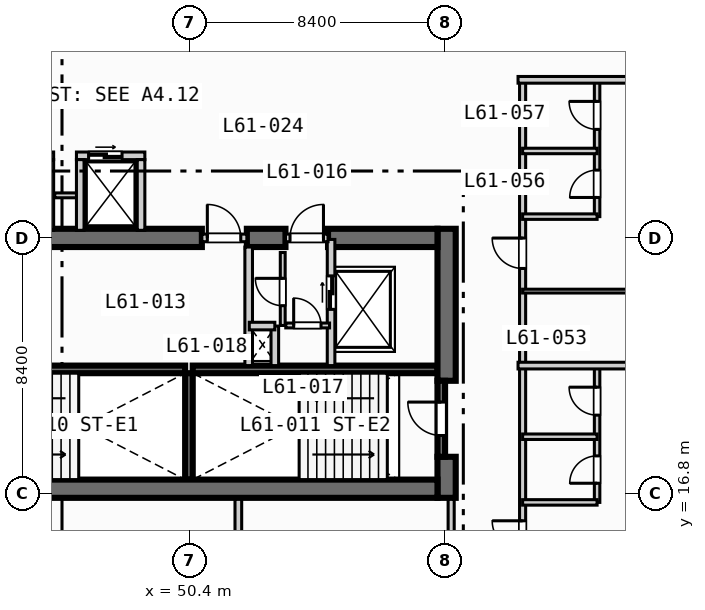
"""IFC4 building model, lengths in metres.
Left out: names, types, materials, properties, quantities, classifications, styles, units other than length and angle.
Written with IfcOpenShell. Run it as: python <this file> out.ifc"""

import sys

from ifc_helpers import new_model, si_unit, direction, frame, frame_2d, origin, place, context, subcontext, project, spatial, rectangle, extrude, element, fill, save


model = new_model("IFC4")
c1 = context("Model", 3, precision=1e-05, world=origin(), true_north=direction((0.0, 1.0)))
c2 = subcontext(c1, "Body", "Model", "MODEL_VIEW")
j1 = project(units=[si_unit("LENGTHUNIT", "METRE"), si_unit("PLANEANGLEUNIT", "RADIAN")], contexts=[c1])
p1 = place(None, origin())
s1 = spatial("IfcSite", under=j1, at=p1, CompositionType="ELEMENT")
p2 = place(p1, origin())
s2 = spatial("IfcBuilding", under=s1, at=p2, CompositionType="ELEMENT")
p3 = place(p2, frame((0.0, 0.0, 249.0)))
s3 = spatial("IfcBuildingStorey", under=s2, at=p3, CompositionType="ELEMENT", Elevation=249.0)
for number, where, z_axis, x_axis in (
    (1, (42.2, 20.875, 0.0), (0.0, 0.0, 1.0), (1.0, 0.0, 0.0)),
    (2, (50.5, 20.875, 0.0), (0.0, 0.0, 1.0), (1.0, 0.0, 0.0)),
):
    element("IfcWall", number, at=place(p3, frame(where, z_axis=z_axis, x_axis=x_axis)), inside=s3, PredefinedType="SOLIDWALL", context=c2, shape_type="SweptSolid", body=[
        extrude(rectangle(XDim=8.05, YDim=0.25, at=frame_2d((4.025, 0.0))), origin(), (0.0, 0.0, 1.0), 3.47),
    ])
p4 = place(p3, frame((50.375, 17.25, 0.0), z_axis=(0.0, 0.0, 1.0), x_axis=(0.0, 1.0, 0.0)))
e3 = element("IfcWall", 3, at=p4, inside=s3, PredefinedType="SOLIDWALL", context=c2, shape_type="SweptSolid", body=[
    extrude(rectangle(XDim=3.5, YDim=0.25, at=frame_2d((1.75, 0.0))), origin(), (0.0, 0.0, 1.0), 3.47),
])
p5 = place(p3, frame((58.85, 16.65, 0.0), z_axis=(0.0, 0.0, 1.0), x_axis=(0.0, 1.0, 0.0)))
e4 = element("IfcWall", 4, at=p5, inside=s3, PredefinedType="SHEAR", context=c2, shape_type="SweptSolid", body=[
    extrude(rectangle(XDim=1.35, YDim=0.6, at=frame_2d((0.675, 0.0))), origin(), (0.0, 0.0, 1.0), 3.47),
])
p6 = place(p3, frame((58.85, 20.5, 0.0), z_axis=(0.0, 0.0, 1.0), x_axis=(0.0, 1.0, 0.0)))
e5 = element("IfcWall", 5, at=p6, inside=s3, PredefinedType="SHEAR", context=c2, shape_type="SweptSolid", body=[
    extrude(rectangle(XDim=5.0, YDim=0.6, at=frame_2d((2.5, 0.0))), origin(), (0.0, 0.0, 1.0), 3.47),
])
p7 = place(p3, frame((42.2, 16.95, 0.0), z_axis=(0.0, 0.0, 1.0), x_axis=(1.0, 0.0, 0.0)))
e6 = element("IfcWall", 6, at=p7, inside=s3, PredefinedType="SHEAR", context=c2, shape_type="SweptSolid", body=[
    extrude(rectangle(XDim=16.35, YDim=0.6, at=frame_2d((8.175, 0.0))), origin(), (0.0, 0.0, 1.0), 3.47),
])
p8 = place(p3, frame((42.2, 25.2, 0.0), z_axis=(0.0, 0.0, 1.0), x_axis=(1.0, 0.0, 0.0)))
e7 = element("IfcWall", 7, at=p8, inside=s3, PredefinedType="SHEAR", context=c2, shape_type="SweptSolid", body=[
    extrude(rectangle(XDim=8.6, YDim=0.6, at=frame_2d((4.3, 0.0))), origin(), (0.0, 0.0, 1.0), 3.47),
])
p9 = place(p3, frame((52.28, 25.2, 0.0), z_axis=(0.0, 0.0, 1.0), x_axis=(1.0, 0.0, 0.0)))
e8 = element("IfcWall", 8, at=p9, inside=s3, PredefinedType="SHEAR", context=c2, shape_type="SweptSolid", body=[
    extrude(rectangle(XDim=1.27, YDim=0.6, at=frame_2d((0.635, 0.0))), origin(), (0.0, 0.0, 1.0), 3.47),
])
p10 = place(p3, frame((54.95, 25.2, 0.0), z_axis=(0.0, 0.0, 1.0), x_axis=(1.0, 0.0, 0.0)))
e9 = element("IfcWall", 9, at=p10, inside=s3, PredefinedType="SHEAR", context=c2, shape_type="SweptSolid", body=[
    extrude(rectangle(XDim=3.6, YDim=0.6, at=frame_2d((1.8, 0.0))), origin(), (0.0, 0.0, 1.0), 3.47),
])
p11 = place(p3, frame((58.675, 18.0, 0.0), z_axis=(0.0, 0.0, 1.0), x_axis=(0.0, 1.0, 0.0)))
e10 = element("IfcWall", 10, at=p11, inside=s3, PredefinedType="SOLIDWALL", context=c2, shape_type="SweptSolid", body=[
    extrude(rectangle(XDim=2.5, YDim=0.25, at=frame_2d((1.25, 0.0))), origin(), (0.0, 0.0, 1.0), 3.47),
])
p12 = place(p11, frame((0.7, 0.0, 0.0)))
e11 = element("IfcOpeningElement", 11, at=p12, cuts=e10, PredefinedType="OPENING", context=c2, shape_type="SweptSolid", body=[
    extrude(rectangle(XDim=1.1, YDim=2.15, at=frame_2d((0.55, 1.075))), frame((0.0, 0.135, 0.0), z_axis=(0.0, -1.0, 0.0), x_axis=(1.0, 0.0, 0.0)), (0.0, 0.0, 1.0), 0.27),
])
p13 = place(p3, frame((50.8, 25.2, 0.0), z_axis=(0.0, 0.0, 1.0), x_axis=(1.0, 0.0, 0.0)))
e12 = element("IfcWall", 12, at=p13, inside=s3, PredefinedType="SOLIDWALL", context=c2, shape_type="SweptSolid", body=[
    extrude(rectangle(XDim=1.48, YDim=0.25, at=frame_2d((0.74, 0.0))), origin(), (0.0, 0.0, 1.0), 3.47),
])
p14 = place(p13, frame((0.18, 0.0, 0.0)))
e13 = element("IfcOpeningElement", 13, at=p14, cuts=e12, PredefinedType="OPENING", context=c2, shape_type="SweptSolid", body=[
    extrude(rectangle(XDim=1.1, YDim=2.15, at=frame_2d((0.55, 1.075))), frame((0.0, 0.135, 0.0), z_axis=(0.0, -1.0, 0.0), x_axis=(1.0, 0.0, 0.0)), (0.0, 0.0, 1.0), 0.27),
])
p15 = place(p3, frame((52.34, 21.0, 0.0), z_axis=(0.0, 0.0, 1.0), x_axis=(0.0, 1.0, 0.0)))
e14 = element("IfcWall", 14, at=p15, inside=s3, PredefinedType="SOLIDWALL", context=c2, shape_type="SweptSolid", body=[
    extrude(rectangle(XDim=3.9, YDim=0.25, at=frame_2d((1.95, 0.0))), origin(), (0.0, 0.0, 1.0), 3.47),
])
p16 = place(p3, frame((55.05, 21.0, 0.0), z_axis=(0.0, 0.0, 1.0), x_axis=(0.0, 1.0, 0.0)))
e15 = element("IfcWall", 15, at=p16, inside=s3, PredefinedType="SOLIDWALL", context=c2, shape_type="SweptSolid", body=[
    extrude(rectangle(XDim=4.15, YDim=0.25, at=frame_2d((2.075, 0.0))), origin(), (0.0, 0.0, 1.0), 3.47),
])
p17 = place(p16, frame((1.85, 0.0, 0.0)))
e16 = element("IfcOpeningElement", 16, at=p17, cuts=e15, PredefinedType="OPENING", context=c2, shape_type="SweptSolid", body=[
    extrude(rectangle(XDim=1.1, YDim=2.15, at=frame_2d((0.55, 1.075))), frame((0.0, 0.135, 0.0), z_axis=(0.0, -1.0, 0.0), x_axis=(1.0, 0.0, 0.0)), (0.0, 0.0, 1.0), 0.27),
])
p18 = place(p3, frame((53.55, 25.2, 0.0), z_axis=(0.0, 0.0, 1.0), x_axis=(1.0, 0.0, 0.0)))
e17 = element("IfcWall", 17, at=p18, inside=s3, PredefinedType="SOLIDWALL", context=c2, shape_type="SweptSolid", body=[
    extrude(rectangle(XDim=1.4, YDim=0.25, at=frame_2d((0.7, 0.0))), origin(), (0.0, 0.0, 1.0), 3.47),
])
p19 = place(p18, frame((0.15, 0.0, 0.0)))
e18 = element("IfcOpeningElement", 18, at=p19, cuts=e17, PredefinedType="OPENING", context=c2, shape_type="SweptSolid", body=[
    extrude(rectangle(XDim=1.1, YDim=2.15, at=frame_2d((0.55, 1.075))), frame((0.0, 0.135, 0.0), z_axis=(0.0, -1.0, 0.0), x_axis=(1.0, 0.0, 0.0)), (0.0, 0.0, 1.0), 0.27),
])
p20 = place(p3, frame((53.2, 21.0, 0.0), z_axis=(0.0, 0.0, 1.0), x_axis=(0.0, 1.0, 0.0)))
e19 = element("IfcWall", 19, at=p20, inside=s3, PredefinedType="SOLIDWALL", context=c2, shape_type="SweptSolid", body=[
    extrude(rectangle(XDim=1.3, YDim=0.25, at=frame_2d((0.65, 0.0))), origin(), (0.0, 0.0, 1.0), 3.47),
])
p21 = place(p3, frame((52.36, 22.3, 0.0), z_axis=(0.0, 0.0, 1.0), x_axis=(1.0, 0.0, 0.0)))
e20 = element("IfcWall", 20, at=p21, inside=s3, PredefinedType="SOLIDWALL", context=c2, shape_type="SweptSolid", body=[
    extrude(rectangle(XDim=0.84, YDim=0.25, at=frame_2d((0.42, 0.0))), origin(), (0.0, 0.0, 1.0), 3.47),
])
p22 = place(p3, frame((53.56, 22.32, 0.0), z_axis=(0.0, 0.0, 1.0), x_axis=(1.0, 0.0, 0.0)))
e21 = element("IfcWall", 21, at=p22, inside=s3, PredefinedType="PARTITIONING", context=c2, shape_type="SweptSolid", body=[
    extrude(rectangle(XDim=1.44, YDim=0.16, at=frame_2d((0.72, 0.0))), origin(), (0.0, 0.0, 1.0), 3.47),
])
p23 = place(p22, frame((0.26, 0.0, 0.0)))
e22 = element("IfcOpeningElement", 22, at=p23, cuts=e21, PredefinedType="OPENING", context=c2, shape_type="SweptSolid", body=[
    extrude(rectangle(XDim=0.9, YDim=2.1, at=frame_2d((0.45, 1.05))), frame((0.0, 0.09, 0.0), z_axis=(0.0, -1.0, 0.0), x_axis=(1.0, 0.0, 0.0)), (0.0, 0.0, 1.0), 0.18),
])
p24 = place(p3, frame((53.46, 22.32, 0.0), z_axis=(0.0, 0.0, 1.0), x_axis=(0.0, 1.0, 0.0)))
e23 = element("IfcWall", 23, at=p24, inside=s3, PredefinedType="PARTITIONING", context=c2, shape_type="SweptSolid", body=[
    extrude(rectangle(XDim=2.4, YDim=0.16, at=frame_2d((1.2, 0.0))), origin(), (0.0, 0.0, 1.0), 3.47),
])
p25 = place(p24, frame((0.65, 0.0, 0.0)))
e24 = element("IfcOpeningElement", 24, at=p25, cuts=e23, PredefinedType="OPENING", context=c2, shape_type="SweptSolid", body=[
    extrude(rectangle(XDim=0.9, YDim=2.1, at=frame_2d((0.45, 1.05))), frame((0.0, 0.09, 0.0), z_axis=(0.0, -1.0, 0.0), x_axis=(1.0, 0.0, 0.0)), (0.0, 0.0, 1.0), 0.18),
])
p26 = place(p3, frame((43.675, 27.9, 0.0), z_axis=(0.0, 0.0, 1.0), x_axis=(1.0, 0.0, 0.0)))
e25 = element("IfcWall", 25, at=p26, inside=s3, PredefinedType="SOLIDWALL", context=c2, shape_type="SweptSolid", body=[
    extrude(rectangle(XDim=2.25, YDim=0.25, at=frame_2d((1.125, 0.0))), origin(), (0.0, 0.0, 1.0), 3.47),
])
p27 = place(p26, frame((0.4, 0.0, 0.0)))
e26 = element("IfcOpeningElement", 26, at=p27, cuts=e25, PredefinedType="OPENING", context=c2, shape_type="SweptSolid", body=[
    extrude(rectangle(XDim=1.1, YDim=2.15, at=frame_2d((0.55, 1.075))), frame((0.0, 0.135, 0.0), z_axis=(0.0, -1.0, 0.0), x_axis=(1.0, 0.0, 0.0)), (0.0, 0.0, 1.0), 0.27),
])
p28 = place(p3, frame((45.8, 25.45, 0.0), z_axis=(0.0, 0.0, 1.0), x_axis=(0.0, 1.0, 0.0)))
e27 = element("IfcWall", 27, at=p28, inside=s3, PredefinedType="SOLIDWALL", context=c2, shape_type="SweptSolid", body=[
    extrude(rectangle(XDim=2.325, YDim=0.25, at=frame_2d((1.163, 0.0))), origin(), (0.0, 0.0, 1.0), 3.47),
])
p29 = place(p3, frame((45.96, 26.6, 0.0), z_axis=(0.0, 0.0, 1.0), x_axis=(1.0, 0.0, 0.0)))
e28 = element("IfcWall", 28, at=p29, inside=s3, PredefinedType="PARTITIONING", context=c2, shape_type="SweptSolid", body=[
    extrude(rectangle(XDim=0.88, YDim=0.16, at=frame_2d((0.44, 0.0))), origin(), (0.0, 0.0, 1.0), 3.47),
])
p30 = place(p3, frame((46.675, 27.9, 0.0), z_axis=(0.0, 0.0, 1.0), x_axis=(1.0, 0.0, 0.0)))
e29 = element("IfcWall", 29, at=p30, inside=s3, PredefinedType="SOLIDWALL", context=c2, shape_type="SweptSolid", body=[
    extrude(rectangle(XDim=2.25, YDim=0.25, at=frame_2d((1.125, 0.0))), origin(), (0.0, 0.0, 1.0), 3.47),
])
p31 = place(p30, frame((0.4, 0.0, 0.0)))
e30 = element("IfcOpeningElement", 30, at=p31, cuts=e29, PredefinedType="OPENING", context=c2, shape_type="SweptSolid", body=[
    extrude(rectangle(XDim=1.1, YDim=2.15, at=frame_2d((0.55, 1.075))), frame((0.0, 0.135, 0.0), z_axis=(0.0, -1.0, 0.0), x_axis=(1.0, 0.0, 0.0)), (0.0, 0.0, 1.0), 0.27),
])
for number, where, z_axis, x_axis in (
    (31, (46.8, 25.45, 0.0), (0.0, 0.0, 1.0), (0.0, 1.0, 0.0)),
    (32, (48.8, 25.45, 0.0), (0.0, 0.0, 1.0), (0.0, 1.0, 0.0)),
):
    element("IfcWall", number, at=place(p3, frame(where, z_axis=z_axis, x_axis=x_axis)), inside=s3, PredefinedType="SOLIDWALL", context=c2, shape_type="SweptSolid", body=[
        extrude(rectangle(XDim=2.325, YDim=0.25, at=frame_2d((1.163, 0.0))), origin(), (0.0, 0.0, 1.0), 3.47),
    ])
p32 = place(p3, frame((59.0, 8.65, 0.0), z_axis=(0.0, 0.0, 1.0), x_axis=(0.0, 1.0, 0.0)))
e33 = element("IfcWall", 33, at=p32, inside=s3, PredefinedType="PARTITIONING", context=c2, shape_type="SweptSolid", body=[
    extrude(rectangle(XDim=7.95, YDim=0.2, at=frame_2d((3.975, 0.0))), origin(), (0.0, 0.0, 1.0), 2.82),
])
p33 = place(p32, frame((2.2, 0.0, 0.0)))
e34 = element("IfcOpeningElement", 34, at=p33, cuts=e33, PredefinedType="OPENING", context=c2, shape_type="SweptSolid", body=[
    extrude(rectangle(XDim=0.92, YDim=2.1, at=frame_2d((0.46, 1.05))), frame((0.0, 0.11, 0.0), z_axis=(0.0, -1.0, 0.0), x_axis=(1.0, 0.0, 0.0)), (0.0, 0.0, 1.0), 0.22),
])
p34 = place(p3, frame((52.0, 8.65, 0.0), z_axis=(0.0, 0.0, 1.0), x_axis=(0.0, 1.0, 0.0)))
e35 = element("IfcWall", 35, at=p34, inside=s3, PredefinedType="PARTITIONING", context=c2, shape_type="SweptSolid", body=[
    extrude(rectangle(XDim=7.95, YDim=0.22, at=frame_2d((3.975, 0.0))), origin(), (0.0, 0.0, 1.0), 3.47),
])
p35 = place(p3, frame((61.35, 11.8, 0.0), z_axis=(0.0, 0.0, 1.0), x_axis=(0.0, 1.0, 0.0)))
e36 = element("IfcWall", 36, at=p35, inside=s3, PredefinedType="PARTITIONING", context=c2, shape_type="SweptSolid", body=[
    extrude(rectangle(XDim=18.6, YDim=0.2, at=frame_2d((9.3, 0.0))), origin(), (0.0, 0.0, 1.0), 3.47),
])
p36 = place(p35, frame((3.095, 0.0, 0.0)))
e37 = element("IfcOpeningElement", 37, at=p36, cuts=e36, PredefinedType="OPENING", context=c2, shape_type="SweptSolid", body=[
    extrude(rectangle(XDim=1.0, YDim=2.15, at=frame_2d((0.5, 1.075))), frame((0.0, 0.11, 0.0), z_axis=(0.0, -1.0, 0.0), x_axis=(1.0, 0.0, 0.0)), (0.0, 0.0, 1.0), 0.22),
])
p37 = place(p35, frame((12.395, 0.0, 0.0)))
e38 = element("IfcOpeningElement", 38, at=p37, cuts=e36, PredefinedType="OPENING", context=c2, shape_type="SweptSolid", body=[
    extrude(rectangle(XDim=1.0, YDim=2.15, at=frame_2d((0.5, 1.075))), frame((0.0, 0.11, 0.0), z_axis=(0.0, -1.0, 0.0), x_axis=(1.0, 0.0, 0.0)), (0.0, 0.0, 1.0), 0.22),
])
p38 = place(p3, frame((63.8, 16.5, 0.0), z_axis=(0.0, 0.0, 1.0), x_axis=(0.0, 1.0, 0.0)))
e39 = element("IfcWall", 39, at=p38, inside=s3, PredefinedType="PLUMBINGWALL", context=c2, shape_type="SweptSolid", body=[
    extrude(rectangle(XDim=4.5, YDim=0.18, at=frame_2d((2.25, 0.0))), origin(), (0.0, 0.0, 1.0), 3.47),
])
p39 = place(p38, frame((0.63, 0.0, 0.0)))
e40 = element("IfcOpeningElement", 40, at=p39, cuts=e39, PredefinedType="OPENING", context=c2, shape_type="SweptSolid", body=[
    extrude(rectangle(XDim=0.9, YDim=2.1, at=frame_2d((0.45, 1.05))), frame((0.0, 0.1, 0.0), z_axis=(0.0, -1.0, 0.0), x_axis=(1.0, 0.0, 0.0)), (0.0, 0.0, 1.0), 0.2),
])
p40 = place(p38, frame((2.87, 0.0, 0.0)))
e41 = element("IfcOpeningElement", 41, at=p40, cuts=e39, PredefinedType="OPENING", context=c2, shape_type="SweptSolid", body=[
    extrude(rectangle(XDim=0.92, YDim=2.1, at=frame_2d((0.46, 1.05))), frame((0.0, 0.1, 0.0), z_axis=(0.0, -1.0, 0.0), x_axis=(1.0, 0.0, 0.0)), (0.0, 0.0, 1.0), 0.2),
])
p41 = place(p3, frame((61.35, 16.5, 0.0), z_axis=(0.0, 0.0, 1.0), x_axis=(1.0, 0.0, 0.0)))
e42 = element("IfcWall", 42, at=p41, inside=s3, PredefinedType="PLUMBINGWALL", context=c2, shape_type="SweptSolid", body=[
    extrude(rectangle(XDim=2.45, YDim=0.18, at=frame_2d((1.225, 0.0))), origin(), (0.0, 0.0, 1.0), 2.82),
])
p42 = place(p3, frame((61.35, 18.66, 0.0), z_axis=(0.0, 0.0, 1.0), x_axis=(1.0, 0.0, 0.0)))
e43 = element("IfcWall", 43, at=p42, inside=s3, PredefinedType="PLUMBINGWALL", context=c2, shape_type="SweptSolid", body=[
    extrude(rectangle(XDim=2.45, YDim=0.18, at=frame_2d((1.225, 0.0))), origin(), (0.0, 0.0, 1.0), 3.47),
])
p43 = place(p3, frame((61.2, 21.0, 0.0), z_axis=(0.0, 0.0, 1.0), x_axis=(1.0, 0.0, 0.0)))
e44 = element("IfcWall", 44, at=p43, inside=s3, PredefinedType="PARTITIONING", context=c2, shape_type="SweptSolid", body=[
    extrude(rectangle(XDim=14.2, YDim=0.22, at=frame_2d((7.1, 0.0))), origin(), (0.0, 0.0, 1.0), 3.47),
])
p44 = place(p3, frame((63.8, 25.9, 0.0), z_axis=(0.0, 0.0, 1.0), x_axis=(0.0, 1.0, 0.0)))
e45 = element("IfcWall", 45, at=p44, inside=s3, PredefinedType="PLUMBINGWALL", context=c2, shape_type="SweptSolid", body=[
    extrude(rectangle(XDim=4.5, YDim=0.18, at=frame_2d((2.25, 0.0))), origin(), (0.0, 0.0, 1.0), 3.47),
])
p45 = place(p44, frame((0.63, 0.0, 0.0)))
e46 = element("IfcOpeningElement", 46, at=p45, cuts=e45, PredefinedType="OPENING", context=c2, shape_type="SweptSolid", body=[
    extrude(rectangle(XDim=0.9, YDim=2.1, at=frame_2d((0.45, 1.05))), frame((0.0, 0.1, 0.0), z_axis=(0.0, -1.0, 0.0), x_axis=(1.0, 0.0, 0.0)), (0.0, 0.0, 1.0), 0.2),
])
p46 = place(p44, frame((2.87, 0.0, 0.0)))
e47 = element("IfcOpeningElement", 47, at=p46, cuts=e45, PredefinedType="OPENING", context=c2, shape_type="SweptSolid", body=[
    extrude(rectangle(XDim=0.92, YDim=2.1, at=frame_2d((0.46, 1.05))), frame((0.0, 0.1, 0.0), z_axis=(0.0, -1.0, 0.0), x_axis=(1.0, 0.0, 0.0)), (0.0, 0.0, 1.0), 0.2),
])
for number, where, z_axis, x_axis in (
    (48, (61.35, 25.9, 0.0), (0.0, 0.0, 1.0), (1.0, 0.0, 0.0)),
    (49, (61.35, 28.06, 0.0), (0.0, 0.0, 1.0), (1.0, 0.0, 0.0)),
):
    element("IfcWall", number, at=place(p3, frame(where, z_axis=z_axis, x_axis=x_axis)), inside=s3, PredefinedType="PLUMBINGWALL", context=c2, shape_type="SweptSolid", body=[
        extrude(rectangle(XDim=2.45, YDim=0.18, at=frame_2d((1.225, 0.0))), origin(), (0.0, 0.0, 1.0), 3.47),
    ])
p47 = place(p3, frame((61.35, 23.45, 0.0), z_axis=(0.0, 0.0, 1.0), x_axis=(1.0, 0.0, 0.0)))
e50 = element("IfcWall", 50, at=p47, inside=s3, PredefinedType="PARTITIONING", context=c2, shape_type="SweptSolid", body=[
    extrude(rectangle(XDim=13.87, YDim=0.125, at=frame_2d((6.935, 0.0))), origin(), (0.0, 0.0, 1.0), 3.47),
])
p48 = place(p47, frame((7.7, 0.0, 0.0)))
e51 = element("IfcOpeningElement", 51, at=p48, cuts=e50, PredefinedType="OPENING", context=c2, shape_type="SweptSolid", body=[
    extrude(rectangle(XDim=0.92, YDim=2.1, at=frame_2d((0.46, 1.05))), frame((0.0, 0.073, 0.0), z_axis=(0.0, -1.0, 0.0), x_axis=(1.0, 0.0, 0.0)), (0.0, 0.0, 1.0), 0.145),
])
p49 = place(p3, frame((61.2, 30.4, 0.0), z_axis=(0.0, 0.0, 1.0), x_axis=(1.0, 0.0, 0.0)))
e52 = element("IfcWall", 52, at=p49, inside=s3, PredefinedType="PARTITIONING", context=c2, shape_type="SweptSolid", body=[
    extrude(rectangle(XDim=10.98, YDim=0.22, at=frame_2d((5.49, 0.0))), origin(), (0.0, 0.0, 1.0), 3.47),
])
p50 = place(p12, origin())
e53 = element("IfcDoor", 53, at=p50, inside=s3, OperationType="SINGLE_SWING_RIGHT", PredefinedType="DOOR", context=c2, shape_type="SweptSolid", body=[
    extrude(rectangle(XDim=1.1, YDim=2.15, at=frame_2d((0.55, 1.075))), frame((0.0, 0.025, 0.0), z_axis=(0.0, -1.0, 0.0), x_axis=(1.0, 0.0, 0.0)), (0.0, 0.0, 1.0), 0.05),
])
fill(e11, e53)
p51 = place(p14, origin())
e54 = element("IfcDoor", 54, at=p51, inside=s3, OperationType="SINGLE_SWING_LEFT", PredefinedType="DOOR", context=c2, shape_type="SweptSolid", body=[
    extrude(rectangle(XDim=1.1, YDim=2.15, at=frame_2d((0.55, 1.075))), frame((0.0, 0.025, 0.0), z_axis=(0.0, -1.0, 0.0), x_axis=(1.0, 0.0, 0.0)), (0.0, 0.0, 1.0), 0.05),
])
fill(e13, e54)
p52 = place(p17, origin())
e55 = element("IfcDoor", 55, at=p52, inside=s3, OperationType="SLIDING_TO_LEFT", PredefinedType="DOOR", context=c2, shape_type="SweptSolid", body=[
    extrude(rectangle(XDim=1.1, YDim=2.15, at=frame_2d((0.55, 1.075))), frame((0.0, 0.025, 0.0), z_axis=(0.0, -1.0, 0.0), x_axis=(1.0, 0.0, 0.0)), (0.0, 0.0, 1.0), 0.05),
])
fill(e16, e55)
p53 = place(p19, origin())
e56 = element("IfcDoor", 56, at=p53, inside=s3, OperationType="SINGLE_SWING_RIGHT", PredefinedType="DOOR", context=c2, shape_type="SweptSolid", body=[
    extrude(rectangle(XDim=1.1, YDim=2.15, at=frame_2d((0.55, 1.075))), frame((0.0, 0.025, 0.0), z_axis=(0.0, -1.0, 0.0), x_axis=(1.0, 0.0, 0.0)), (0.0, 0.0, 1.0), 0.05),
])
fill(e18, e56)
p54 = place(p23, origin())
e57 = element("IfcDoor", 57, at=p54, inside=s3, OperationType="SINGLE_SWING_LEFT", PredefinedType="DOOR", context=c2, shape_type="SweptSolid", body=[
    extrude(rectangle(XDim=0.9, YDim=2.1, at=frame_2d((0.45, 1.05))), frame((0.0, 0.025, 0.0), z_axis=(0.0, -1.0, 0.0), x_axis=(1.0, 0.0, 0.0)), (0.0, 0.0, 1.0), 0.05),
])
fill(e22, e57)
p55 = place(p25, origin())
e58 = element("IfcDoor", 58, at=p55, inside=s3, OperationType="SINGLE_SWING_RIGHT", PredefinedType="DOOR", context=c2, shape_type="SweptSolid", body=[
    extrude(rectangle(XDim=0.9, YDim=2.1, at=frame_2d((0.45, 1.05))), frame((0.0, 0.025, 0.0), z_axis=(0.0, -1.0, 0.0), x_axis=(1.0, 0.0, 0.0)), (0.0, 0.0, 1.0), 0.05),
])
fill(e24, e58)
p56 = place(p31, origin())
e59 = element("IfcDoor", 59, at=p56, inside=s3, OperationType="SLIDING_TO_LEFT", PredefinedType="DOOR", context=c2, shape_type="SweptSolid", body=[
    extrude(rectangle(XDim=1.1, YDim=2.15, at=frame_2d((0.55, 1.075))), frame((0.0, 0.025, 0.0), z_axis=(0.0, -1.0, 0.0), x_axis=(1.0, 0.0, 0.0)), (0.0, 0.0, 1.0), 0.05),
])
fill(e30, e59)
p57 = place(p36, origin())
e60 = element("IfcDoor", 60, at=p57, inside=s3, OperationType="SINGLE_SWING_RIGHT", PredefinedType="DOOR", context=c2, shape_type="SweptSolid", body=[
    extrude(rectangle(XDim=1.0, YDim=2.15, at=frame_2d((0.5, 1.075))), frame((0.0, 0.025, 0.0), z_axis=(0.0, -1.0, 0.0), x_axis=(1.0, 0.0, 0.0)), (0.0, 0.0, 1.0), 0.05),
])
fill(e37, e60)
p58 = place(p37, origin())
e61 = element("IfcDoor", 61, at=p58, inside=s3, OperationType="SINGLE_SWING_RIGHT", PredefinedType="DOOR", context=c2, shape_type="SweptSolid", body=[
    extrude(rectangle(XDim=1.0, YDim=2.15, at=frame_2d((0.5, 1.075))), frame((0.0, 0.025, 0.0), z_axis=(0.0, -1.0, 0.0), x_axis=(1.0, 0.0, 0.0)), (0.0, 0.0, 1.0), 0.05),
])
fill(e38, e61)
p59 = place(p39, origin())
e62 = element("IfcDoor", 62, at=p59, inside=s3, OperationType="SINGLE_SWING_LEFT", PredefinedType="DOOR", context=c2, shape_type="SweptSolid", body=[
    extrude(rectangle(XDim=0.9, YDim=2.1, at=frame_2d((0.45, 1.05))), frame((0.0, 0.025, 0.0), z_axis=(0.0, -1.0, 0.0), x_axis=(1.0, 0.0, 0.0)), (0.0, 0.0, 1.0), 0.05),
])
fill(e40, e62)
p60 = place(p40, origin())
e63 = element("IfcDoor", 63, at=p60, inside=s3, OperationType="SINGLE_SWING_RIGHT", PredefinedType="DOOR", context=c2, shape_type="SweptSolid", body=[
    extrude(rectangle(XDim=0.92, YDim=2.1, at=frame_2d((0.46, 1.05))), frame((0.0, 0.025, 0.0), z_axis=(0.0, -1.0, 0.0), x_axis=(1.0, 0.0, 0.0)), (0.0, 0.0, 1.0), 0.05),
])
fill(e41, e63)
p61 = place(p45, origin())
e64 = element("IfcDoor", 64, at=p61, inside=s3, OperationType="SINGLE_SWING_LEFT", PredefinedType="DOOR", context=c2, shape_type="SweptSolid", body=[
    extrude(rectangle(XDim=0.9, YDim=2.1, at=frame_2d((0.45, 1.05))), frame((0.0, 0.025, 0.0), z_axis=(0.0, -1.0, 0.0), x_axis=(1.0, 0.0, 0.0)), (0.0, 0.0, 1.0), 0.05),
])
fill(e46, e64)
p62 = place(p46, origin())
e65 = element("IfcDoor", 65, at=p62, inside=s3, OperationType="SINGLE_SWING_RIGHT", PredefinedType="DOOR", context=c2, shape_type="SweptSolid", body=[
    extrude(rectangle(XDim=0.92, YDim=2.1, at=frame_2d((0.46, 1.05))), frame((0.0, 0.025, 0.0), z_axis=(0.0, -1.0, 0.0), x_axis=(1.0, 0.0, 0.0)), (0.0, 0.0, 1.0), 0.05),
])
fill(e47, e65)
save(model, sys.argv[1])
